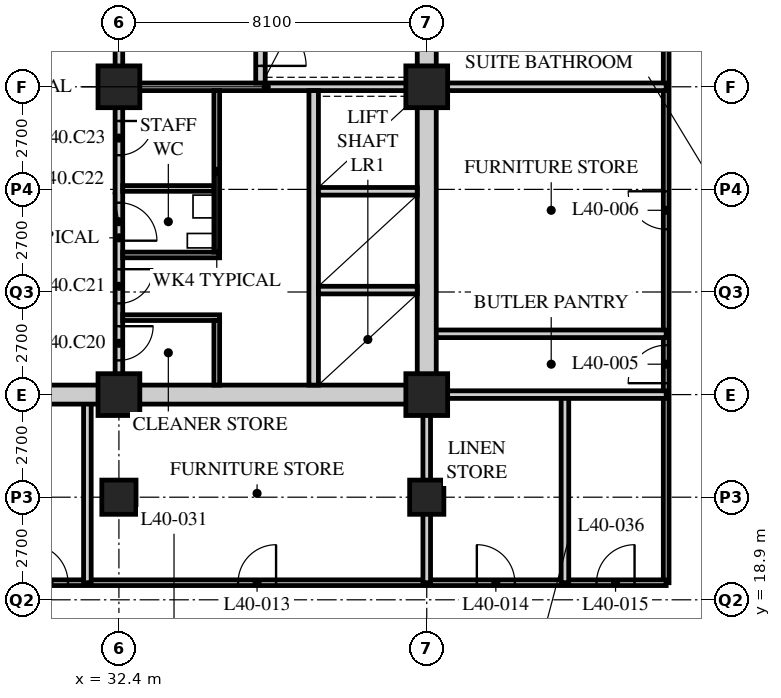
"""IFC4 building model, lengths in metres.
Left out: names, types, materials, properties, quantities, classifications, styles, units other than length and angle.
Written with IfcOpenShell. Run it as: python <this file> out.ifc"""

import sys

from ifc_helpers import new_model, si_unit, direction, frame, frame_2d, origin, origin_2d, place, context, subcontext, project, spatial, rectangle, hollow_rectangle, extrude, element, fill, save


model = new_model("IFC4")
c1 = context("Model", 3, precision=1e-05, world=origin(), true_north=direction((0.0, 1.0)))
c2 = subcontext(c1, "Body", "Model", "MODEL_VIEW")
j1 = project(units=[si_unit("LENGTHUNIT", "METRE"), si_unit("PLANEANGLEUNIT", "RADIAN")], contexts=[c1])
p1 = place(None, origin())
s1 = spatial("IfcSite", under=j1, at=p1, CompositionType="ELEMENT")
p2 = place(p1, origin())
s2 = spatial("IfcBuilding", under=s1, at=p2, CompositionType="ELEMENT")
p3 = place(p2, frame((0.0, 0.0, 154.4)))
s3 = spatial("IfcBuildingStorey", under=s2, at=p3, CompositionType="ELEMENT", Elevation=154.4)
p4 = place(p3, frame((32.4, 21.6, 0.0), z_axis=(0.0, 0.0, 1.0), x_axis=(1.0, 0.0, 0.0)))
e1 = element("IfcColumn", 1, at=p4, inside=s3, PredefinedType="COLUMN", context=c2, shape_type="SweptSolid", body=[
    extrude(hollow_rectangle(XDim=0.9, YDim=0.9, WallThickness=0.1, at=origin_2d()), origin(), (0.0, 0.0, 1.0), 3.4),
])
for number, where, z_axis, x_axis in (
    (2, (32.4, 24.3, 0.0), (0.0, 0.0, 1.0), (1.0, 0.0, 0.0)),
    (3, (32.4, 32.4, 0.0), (0.0, 0.0, 1.0), (1.0, 0.0, 0.0)),
):
    element("IfcColumn", number, at=place(p3, frame(where, z_axis=z_axis, x_axis=x_axis)), inside=s3, PredefinedType="COLUMN", context=c2, shape_type="SweptSolid", body=[
        extrude(hollow_rectangle(XDim=1.1, YDim=1.1, WallThickness=0.1, at=origin_2d()), origin(), (0.0, 0.0, 1.0), 3.4),
    ])
p5 = place(p3, frame((40.5, 21.6, 0.0), z_axis=(0.0, 0.0, 1.0), x_axis=(1.0, 0.0, 0.0)))
e4 = element("IfcColumn", 4, at=p5, inside=s3, PredefinedType="COLUMN", context=c2, shape_type="SweptSolid", body=[
    extrude(hollow_rectangle(XDim=0.9, YDim=0.9, WallThickness=0.1, at=origin_2d()), origin(), (0.0, 0.0, 1.0), 3.4),
])
for number, where, z_axis, x_axis in (
    (5, (40.5, 24.3, 0.0), (0.0, 0.0, 1.0), (1.0, 0.0, 0.0)),
    (6, (40.5, 32.4, 0.0), (0.0, 0.0, 1.0), (1.0, 0.0, 0.0)),
):
    element("IfcColumn", number, at=place(p3, frame(where, z_axis=z_axis, x_axis=x_axis)), inside=s3, PredefinedType="COLUMN", context=c2, shape_type="SweptSolid", body=[
        extrude(hollow_rectangle(XDim=1.1, YDim=1.1, WallThickness=0.1, at=origin_2d()), origin(), (0.0, 0.0, 1.0), 3.4),
    ])
p6 = place(p3, frame((46.8, 19.35, 0.0), z_axis=(0.0, 0.0, 1.0), x_axis=(0.0, 1.0, 0.0)))
e7 = element("IfcWall", 7, at=p6, inside=s3, PredefinedType="PARTITIONING", context=c2, shape_type="SweptSolid", body=[
    extrude(rectangle(XDim=24.75, YDim=0.15, at=frame_2d((12.375, 0.0))), origin(), (0.0, 0.0, 1.0), 3.15),
])
p7 = place(p6, frame((5.25, 0.0, 0.0)))
e8 = element("IfcOpeningElement", 8, at=p7, cuts=e7, PredefinedType="OPENING", context=c2, shape_type="SweptSolid", body=[
    extrude(rectangle(XDim=1.0, YDim=2.1, at=frame_2d((0.5, 1.05))), frame((0.0, 0.085, 0.0), z_axis=(0.0, -1.0, 0.0), x_axis=(1.0, 0.0, 0.0)), (0.0, 0.0, 1.0), 0.17),
])
p8 = place(p6, frame((9.3, 0.0, 0.0)))
e9 = element("IfcOpeningElement", 9, at=p8, cuts=e7, PredefinedType="OPENING", context=c2, shape_type="SweptSolid", body=[
    extrude(rectangle(XDim=1.0, YDim=2.1, at=frame_2d((0.5, 1.05))), frame((0.0, 0.085, 0.0), z_axis=(0.0, -1.0, 0.0), x_axis=(1.0, 0.0, 0.0)), (0.0, 0.0, 1.0), 0.17),
])
p9 = place(p6, frame((16.6, 0.0, 0.0)))
e10 = element("IfcOpeningElement", 10, at=p9, cuts=e7, PredefinedType="OPENING", context=c2, shape_type="SweptSolid", body=[
    extrude(rectangle(XDim=1.0, YDim=2.1, at=frame_2d((0.5, 1.05))), frame((0.0, 0.085, 0.0), z_axis=(0.0, -1.0, 0.0), x_axis=(1.0, 0.0, 0.0)), (0.0, 0.0, 1.0), 0.17),
])
p10 = place(p3, frame((29.56, 19.35, 0.0), z_axis=(0.0, 0.0, 1.0), x_axis=(1.0, 0.0, 0.0)))
e11 = element("IfcWall", 11, at=p10, inside=s3, PredefinedType="PARTITIONING", context=c2, shape_type="SweptSolid", body=[
    extrude(rectangle(XDim=17.24, YDim=0.15, at=frame_2d((8.62, 0.0))), origin(), (0.0, 0.0, 1.0), 3.15),
])
p11 = place(p10, frame((0.5, 0.0, 0.0)))
e12 = element("IfcOpeningElement", 12, at=p11, cuts=e11, PredefinedType="OPENING", context=c2, shape_type="SweptSolid", body=[
    extrude(rectangle(XDim=1.0, YDim=2.1, at=frame_2d((0.5, 1.05))), frame((0.0, 0.085, 0.0), z_axis=(0.0, -1.0, 0.0), x_axis=(1.0, 0.0, 0.0)), (0.0, 0.0, 1.0), 0.17),
])
p12 = place(p10, frame((5.975, 0.0, 0.0)))
e13 = element("IfcOpeningElement", 13, at=p12, cuts=e11, PredefinedType="OPENING", context=c2, shape_type="SweptSolid", body=[
    extrude(rectangle(XDim=1.0, YDim=2.1, at=frame_2d((0.5, 1.05))), frame((0.0, 0.085, 0.0), z_axis=(0.0, -1.0, 0.0), x_axis=(1.0, 0.0, 0.0)), (0.0, 0.0, 1.0), 0.17),
])
p13 = place(p10, frame((12.258, 0.0, 0.0)))
e14 = element("IfcOpeningElement", 14, at=p13, cuts=e11, PredefinedType="OPENING", context=c2, shape_type="SweptSolid", body=[
    extrude(rectangle(XDim=1.0, YDim=2.1, at=frame_2d((0.5, 1.05))), frame((0.0, 0.085, 0.0), z_axis=(0.0, -1.0, 0.0), x_axis=(1.0, 0.0, 0.0)), (0.0, 0.0, 1.0), 0.17),
])
p14 = place(p10, frame((15.408, 0.0, 0.0)))
e15 = element("IfcOpeningElement", 15, at=p14, cuts=e11, PredefinedType="OPENING", context=c2, shape_type="SweptSolid", body=[
    extrude(rectangle(XDim=1.0, YDim=2.1, at=frame_2d((0.5, 1.05))), frame((0.0, 0.085, 0.0), z_axis=(0.0, -1.0, 0.0), x_axis=(1.0, 0.0, 0.0)), (0.0, 0.0, 1.0), 0.17),
])
for number, where, z_axis, x_axis in (
    (16, (40.5, 32.4, 0.0), (0.0, 0.0, 1.0), (1.0, 0.0, 0.0)),
    (17, (46.8, 25.9, 0.0), (0.0, 0.0, 1.0), (-1.0, 0.0, 0.0)),
):
    element("IfcWall", number, at=place(p3, frame(where, z_axis=z_axis, x_axis=x_axis)), inside=s3, PredefinedType="SOLIDWALL", context=c2, shape_type="SweptSolid", body=[
        extrude(rectangle(XDim=6.3, YDim=0.2, at=frame_2d((3.15, 0.0))), origin(), (0.0, 0.0, 1.0), 3.15),
    ])
p15 = place(p3, frame((40.5, 19.35, 0.0), z_axis=(0.0, 0.0, 1.0), x_axis=(0.0, 1.0, 0.0)))
e18 = element("IfcWall", 18, at=p15, inside=s3, PredefinedType="SOLIDWALL", context=c2, shape_type="SweptSolid", body=[
    extrude(rectangle(XDim=4.95, YDim=0.2, at=frame_2d((2.475, 0.0))), origin(), (0.0, 0.0, 1.0), 2.15),
])
for number, where, z_axis, x_axis in (
    (19, (31.57, 19.35, 0.0), (0.0, 0.0, 1.0), (0.0, 1.0, 0.0)),
    (20, (44.136, 19.35, 0.0), (0.0, 0.0, 1.0), (0.0, 1.0, 0.0)),
):
    element("IfcWall", number, at=place(p3, frame(where, z_axis=z_axis, x_axis=x_axis)), inside=s3, PredefinedType="SOLIDWALL", context=c2, shape_type="SweptSolid", body=[
        extrude(rectangle(XDim=4.95, YDim=0.2, at=frame_2d((2.475, 0.0))), origin(), (0.0, 0.0, 1.0), 3.15),
    ])
p16 = place(p3, frame((40.5, 24.3, 0.0), z_axis=(0.0, 0.0, 1.0), x_axis=(1.0, 0.0, 0.0)))
e21 = element("IfcWall", 21, at=p16, inside=s3, PredefinedType="SOLIDWALL", context=c2, shape_type="SweptSolid", body=[
    extrude(rectangle(XDim=6.3, YDim=0.2, at=frame_2d((3.15, 0.0))), origin(), (0.0, 0.0, 1.0), 3.15),
])
p17 = place(p3, frame((24.3, 24.3, 0.0), z_axis=(0.0, 0.0, 1.0), x_axis=(1.0, 0.0, 0.0)))
e22 = element("IfcWall", 22, at=p17, inside=s3, PredefinedType="SOLIDWALL", context=c2, shape_type="SweptSolid", body=[
    extrude(rectangle(XDim=8.1, YDim=0.5, at=frame_2d((4.05, 0.0))), origin(), (0.0, 0.0, 1.0), 2.5),
])
p18 = place(p17, frame((3.15, 0.0, 0.0)))
e23 = element("IfcOpeningElement", 23, at=p18, cuts=e22, PredefinedType="OPENING", context=c2, shape_type="SweptSolid", body=[
    extrude(rectangle(XDim=1.8, YDim=2.4, at=frame_2d((0.9, 1.2))), frame((0.0, 0.26, 0.0), z_axis=(0.0, -1.0, 0.0), x_axis=(1.0, 0.0, 0.0)), (0.0, 0.0, 1.0), 0.52),
])
p19 = place(p3, frame((32.4, 24.3, 0.0), z_axis=(0.0, 0.0, 1.0), x_axis=(1.0, 0.0, 0.0)))
e24 = element("IfcWall", 24, at=p19, inside=s3, PredefinedType="SOLIDWALL", context=c2, shape_type="SweptSolid", body=[
    extrude(rectangle(XDim=8.35, YDim=0.5, at=frame_2d((4.175, 0.0))), origin(), (0.0, 0.0, 1.0), 2.38),
])
p20 = place(p3, frame((40.5, 24.55, 0.0), z_axis=(0.0, 0.0, 1.0), x_axis=(0.0, 1.0, 0.0)))
e25 = element("IfcWall", 25, at=p20, inside=s3, PredefinedType="SOLIDWALL", context=c2, shape_type="SweptSolid", body=[
    extrude(rectangle(XDim=15.7, YDim=0.5, at=frame_2d((7.85, 0.0))), origin(), (0.0, 0.0, 1.0), 2.15),
])
p21 = place(p3, frame((32.3, 32.4, 0.0), z_axis=(0.0, 0.0, 1.0), x_axis=(1.0, 0.0, 0.0)))
e26 = element("IfcWall", 26, at=p21, inside=s3, PredefinedType="SOLIDWALL", context=c2, shape_type="SweptSolid", body=[
    extrude(rectangle(XDim=7.95, YDim=0.2, at=frame_2d((3.975, 0.0))), origin(), (0.0, 0.0, 1.0), 2.388),
])
p22 = place(p3, frame((32.4, 32.5, 0.0), z_axis=(0.0, 0.0, 1.0), x_axis=(0.0, 1.0, 0.0)))
e27 = element("IfcWall", 27, at=p22, inside=s3, PredefinedType="SOLIDWALL", context=c2, shape_type="SweptSolid", body=[
    extrude(rectangle(XDim=7.75, YDim=0.2, at=frame_2d((3.875, 0.0))), origin(), (0.0, 0.0, 1.0), 2.388),
])
p23 = place(p22, frame((1.9, 0.0, 0.0)))
e28 = element("IfcOpeningElement", 28, at=p23, cuts=e27, PredefinedType="OPENING", context=c2, shape_type="SweptSolid", body=[
    extrude(rectangle(XDim=1.2, YDim=2.1, at=frame_2d((0.6, 1.05))), frame((0.0, 0.11, 0.0), z_axis=(0.0, -1.0, 0.0), x_axis=(1.0, 0.0, 0.0)), (0.0, 0.0, 1.0), 0.22),
])
p24 = place(p3, frame((37.525, 24.55, 0.0), z_axis=(0.0, 0.0, 1.0), x_axis=(0.0, 1.0, 0.0)))
e29 = element("IfcWall", 29, at=p24, inside=s3, PredefinedType="SOLIDWALL", context=c2, shape_type="SweptSolid", body=[
    extrude(rectangle(XDim=7.75, YDim=0.25, at=frame_2d((3.875, 0.0))), origin(), (0.0, 0.0, 1.0), 3.15),
])
for number, where, z_axis, x_axis in (
    (30, (37.65, 27.05, 0.0), (0.0, 0.0, 1.0), (1.0, 0.0, 0.0)),
    (31, (37.65, 29.65, 0.0), (0.0, 0.0, 1.0), (1.0, 0.0, 0.0)),
):
    element("IfcWall", number, at=place(p3, frame(where, z_axis=z_axis, x_axis=x_axis)), inside=s3, PredefinedType="SOLIDWALL", context=c2, shape_type="SweptSolid", body=[
        extrude(rectangle(XDim=2.6, YDim=0.2, at=frame_2d((1.3, 0.0))), origin(), (0.0, 0.0, 1.0), 3.15),
    ])
p25 = place(p3, frame((36.125, 32.5, 0.0), z_axis=(0.0, 0.0, 1.0), x_axis=(0.0, 1.0, 0.0)))
e32 = element("IfcWall", 32, at=p25, inside=s3, PredefinedType="SOLIDWALL", context=c2, shape_type="SweptSolid", body=[
    extrude(rectangle(XDim=7.75, YDim=0.25, at=frame_2d((3.875, 0.0))), origin(), (0.0, 0.0, 1.0), 3.15),
])
p26 = place(p25, frame((0.45, 0.0, 0.0)))
e33 = element("IfcOpeningElement", 33, at=p26, cuts=e32, PredefinedType="OPENING", context=c2, shape_type="SweptSolid", body=[
    extrude(rectangle(XDim=1.2, YDim=2.1, at=frame_2d((0.6, 1.05))), frame((0.0, 0.135, 0.0), z_axis=(0.0, -1.0, 0.0), x_axis=(1.0, 0.0, 0.0)), (0.0, 0.0, 1.0), 0.27),
])
p27 = place(p3, frame((32.4, 24.55, 0.0), z_axis=(0.0, 0.0, 1.0), x_axis=(0.0, 1.0, 0.0)))
e34 = element("IfcWall", 34, at=p27, inside=s3, PredefinedType="PARTITIONING", context=c2, shape_type="SweptSolid", body=[
    extrude(rectangle(XDim=7.75, YDim=0.2, at=frame_2d((3.875, 0.0))), origin(), (0.0, 0.0, 1.0), 2.388),
])
p28 = place(p27, frame((0.65, 0.0, 0.0)))
e35 = element("IfcOpeningElement", 35, at=p28, cuts=e34, PredefinedType="OPENING", context=c2, shape_type="SweptSolid", body=[
    extrude(rectangle(XDim=0.9, YDim=2.1, at=frame_2d((0.45, 1.05))), frame((0.0, 0.11, 0.0), z_axis=(0.0, -1.0, 0.0), x_axis=(1.0, 0.0, 0.0)), (0.0, 0.0, 1.0), 0.22),
])
p29 = place(p27, frame((2.15, 0.0, 0.0)))
e36 = element("IfcOpeningElement", 36, at=p29, cuts=e34, PredefinedType="OPENING", context=c2, shape_type="SweptSolid", body=[
    extrude(rectangle(XDim=0.9, YDim=2.1, at=frame_2d((0.45, 1.05))), frame((0.0, 0.11, 0.0), z_axis=(0.0, -1.0, 0.0), x_axis=(1.0, 0.0, 0.0)), (0.0, 0.0, 1.0), 0.22),
])
p30 = place(p27, frame((3.8, 0.0, 0.0)))
e37 = element("IfcOpeningElement", 37, at=p30, cuts=e34, PredefinedType="OPENING", context=c2, shape_type="SweptSolid", body=[
    extrude(rectangle(XDim=1.0, YDim=2.1, at=frame_2d((0.5, 1.05))), frame((0.0, 0.11, 0.0), z_axis=(0.0, -1.0, 0.0), x_axis=(1.0, 0.0, 0.0)), (0.0, 0.0, 1.0), 0.22),
])
p31 = place(p27, frame((6.05, 0.0, 0.0)))
e38 = element("IfcOpeningElement", 38, at=p31, cuts=e34, PredefinedType="OPENING", context=c2, shape_type="SweptSolid", body=[
    extrude(rectangle(XDim=0.9, YDim=2.1, at=frame_2d((0.45, 1.05))), frame((0.0, 0.11, 0.0), z_axis=(0.0, -1.0, 0.0), x_axis=(1.0, 0.0, 0.0)), (0.0, 0.0, 1.0), 0.22),
])
for number, where, z_axis, x_axis in (
    (39, (32.5, 26.325, 0.0), (0.0, 0.0, 1.0), (1.0, 0.0, 0.0)),
    (40, (32.5, 27.975, 0.0), (0.0, 0.0, 1.0), (1.0, 0.0, 0.0)),
):
    element("IfcWall", number, at=place(p3, frame(where, z_axis=z_axis, x_axis=x_axis)), inside=s3, PredefinedType="PARTITIONING", context=c2, shape_type="SweptSolid", body=[
        extrude(rectangle(XDim=2.55, YDim=0.15, at=frame_2d((1.275, 0.0))), origin(), (0.0, 0.0, 1.0), 3.15),
    ])
p32 = place(p3, frame((32.5, 29.725, 0.0), z_axis=(0.0, 0.0, 1.0), x_axis=(1.0, 0.0, 0.0)))
e41 = element("IfcWall", 41, at=p32, inside=s3, PredefinedType="PARTITIONING", context=c2, shape_type="SweptSolid", body=[
    extrude(rectangle(XDim=2.4, YDim=0.15, at=frame_2d((1.2, 0.0))), origin(), (0.0, 0.0, 1.0), 3.15),
])
p33 = place(p3, frame((34.975, 24.55, 0.0), z_axis=(0.0, 0.0, 1.0), x_axis=(0.0, 1.0, 0.0)))
e42 = element("IfcWall", 42, at=p33, inside=s3, PredefinedType="PARTITIONING", context=c2, shape_type="SweptSolid", body=[
    extrude(rectangle(XDim=1.7, YDim=0.15, at=frame_2d((0.85, 0.0))), origin(), (0.0, 0.0, 1.0), 3.15),
])
p34 = place(p3, frame((34.975, 28.05, 0.0), z_axis=(0.0, 0.0, 1.0), x_axis=(0.0, 1.0, 0.0)))
e43 = element("IfcWall", 43, at=p34, inside=s3, PredefinedType="PARTITIONING", context=c2, shape_type="SweptSolid", body=[
    extrude(rectangle(XDim=4.25, YDim=0.15, at=frame_2d((2.125, 0.0))), origin(), (0.0, 0.0, 1.0), 3.15),
])
p35 = place(p7, origin())
e44 = element("IfcDoor", 44, at=p35, inside=s3, OperationType="SINGLE_SWING_LEFT", PredefinedType="DOOR", context=c2, shape_type="SweptSolid", body=[
    extrude(rectangle(XDim=1.0, YDim=2.1, at=frame_2d((0.5, 1.05))), frame((0.0, 0.025, 0.0), z_axis=(0.0, -1.0, 0.0), x_axis=(1.0, 0.0, 0.0)), (0.0, 0.0, 1.0), 0.05),
])
fill(e8, e44)
p36 = place(p8, origin())
e45 = element("IfcDoor", 45, at=p36, inside=s3, OperationType="SINGLE_SWING_RIGHT", PredefinedType="DOOR", context=c2, shape_type="SweptSolid", body=[
    extrude(rectangle(XDim=1.0, YDim=2.1, at=frame_2d((0.5, 1.05))), frame((0.0, 0.025, 0.0), z_axis=(0.0, -1.0, 0.0), x_axis=(1.0, 0.0, 0.0)), (0.0, 0.0, 1.0), 0.05),
])
fill(e9, e45)
p37 = place(p11, origin())
e46 = element("IfcDoor", 46, at=p37, inside=s3, OperationType="SINGLE_SWING_LEFT", PredefinedType="DOOR", context=c2, shape_type="SweptSolid", body=[
    extrude(rectangle(XDim=1.0, YDim=2.1, at=frame_2d((0.5, 1.05))), frame((0.0, 0.025, 0.0), z_axis=(0.0, -1.0, 0.0), x_axis=(1.0, 0.0, 0.0)), (0.0, 0.0, 1.0), 0.05),
])
fill(e12, e46)
p38 = place(p12, origin())
e47 = element("IfcDoor", 47, at=p38, inside=s3, OperationType="SINGLE_SWING_RIGHT", PredefinedType="DOOR", context=c2, shape_type="SweptSolid", body=[
    extrude(rectangle(XDim=1.0, YDim=2.1, at=frame_2d((0.5, 1.05))), frame((0.0, 0.025, 0.0), z_axis=(0.0, -1.0, 0.0), x_axis=(1.0, 0.0, 0.0)), (0.0, 0.0, 1.0), 0.05),
])
fill(e13, e47)
p39 = place(p13, origin())
e48 = element("IfcDoor", 48, at=p39, inside=s3, OperationType="SINGLE_SWING_LEFT", PredefinedType="DOOR", context=c2, shape_type="SweptSolid", body=[
    extrude(rectangle(XDim=1.0, YDim=2.1, at=frame_2d((0.5, 1.05))), frame((0.0, 0.025, 0.0), z_axis=(0.0, -1.0, 0.0), x_axis=(1.0, 0.0, 0.0)), (0.0, 0.0, 1.0), 0.05),
])
fill(e14, e48)
p40 = place(p14, origin())
e49 = element("IfcDoor", 49, at=p40, inside=s3, OperationType="SINGLE_SWING_RIGHT", PredefinedType="DOOR", context=c2, shape_type="SweptSolid", body=[
    extrude(rectangle(XDim=1.0, YDim=2.1, at=frame_2d((0.5, 1.05))), frame((0.0, 0.025, 0.0), z_axis=(0.0, -1.0, 0.0), x_axis=(1.0, 0.0, 0.0)), (0.0, 0.0, 1.0), 0.05),
])
fill(e15, e49)
p41 = place(p28, origin())
e50 = element("IfcDoor", 50, at=p41, inside=s3, OperationType="SINGLE_SWING_LEFT", PredefinedType="DOOR", context=c2, shape_type="SweptSolid", body=[
    extrude(rectangle(XDim=0.9, YDim=2.1, at=frame_2d((0.45, 1.05))), frame((0.0, 0.025, 0.0), z_axis=(0.0, -1.0, 0.0), x_axis=(1.0, 0.0, 0.0)), (0.0, 0.0, 1.0), 0.05),
])
fill(e35, e50)
p42 = place(p29, origin())
e51 = element("IfcDoor", 51, at=p42, inside=s3, OperationType="SINGLE_SWING_LEFT", PredefinedType="DOOR", context=c2, shape_type="SweptSolid", body=[
    extrude(rectangle(XDim=0.9, YDim=2.1, at=frame_2d((0.45, 1.05))), frame((0.0, 0.025, 0.0), z_axis=(0.0, -1.0, 0.0), x_axis=(1.0, 0.0, 0.0)), (0.0, 0.0, 1.0), 0.05),
])
fill(e36, e51)
p43 = place(p30, origin())
e52 = element("IfcDoor", 52, at=p43, inside=s3, OperationType="SINGLE_SWING_RIGHT", PredefinedType="DOOR", context=c2, shape_type="SweptSolid", body=[
    extrude(rectangle(XDim=1.0, YDim=2.1, at=frame_2d((0.5, 1.05))), frame((0.0, 0.025, 0.0), z_axis=(0.0, -1.0, 0.0), x_axis=(1.0, 0.0, 0.0)), (0.0, 0.0, 1.0), 0.05),
])
fill(e37, e52)
p44 = place(p31, origin())
e53 = element("IfcDoor", 53, at=p44, inside=s3, OperationType="SINGLE_SWING_LEFT", PredefinedType="DOOR", context=c2, shape_type="SweptSolid", body=[
    extrude(rectangle(XDim=0.9, YDim=2.1, at=frame_2d((0.45, 1.05))), frame((0.0, 0.025, 0.0), z_axis=(0.0, -1.0, 0.0), x_axis=(1.0, 0.0, 0.0)), (0.0, 0.0, 1.0), 0.05),
])
fill(e38, e53)
p45 = place(p26, origin())
e54 = element("IfcDoor", 54, at=p45, inside=s3, OperationType="SINGLE_SWING_RIGHT", PredefinedType="DOOR", context=c2, shape_type="SweptSolid", body=[
    extrude(rectangle(XDim=1.2, YDim=2.1, at=frame_2d((0.6, 1.05))), frame((0.0, 0.025, 0.0), z_axis=(0.0, -1.0, 0.0), x_axis=(1.0, 0.0, 0.0)), (0.0, 0.0, 1.0), 0.05),
])
fill(e33, e54)
save(model, sys.argv[1])
